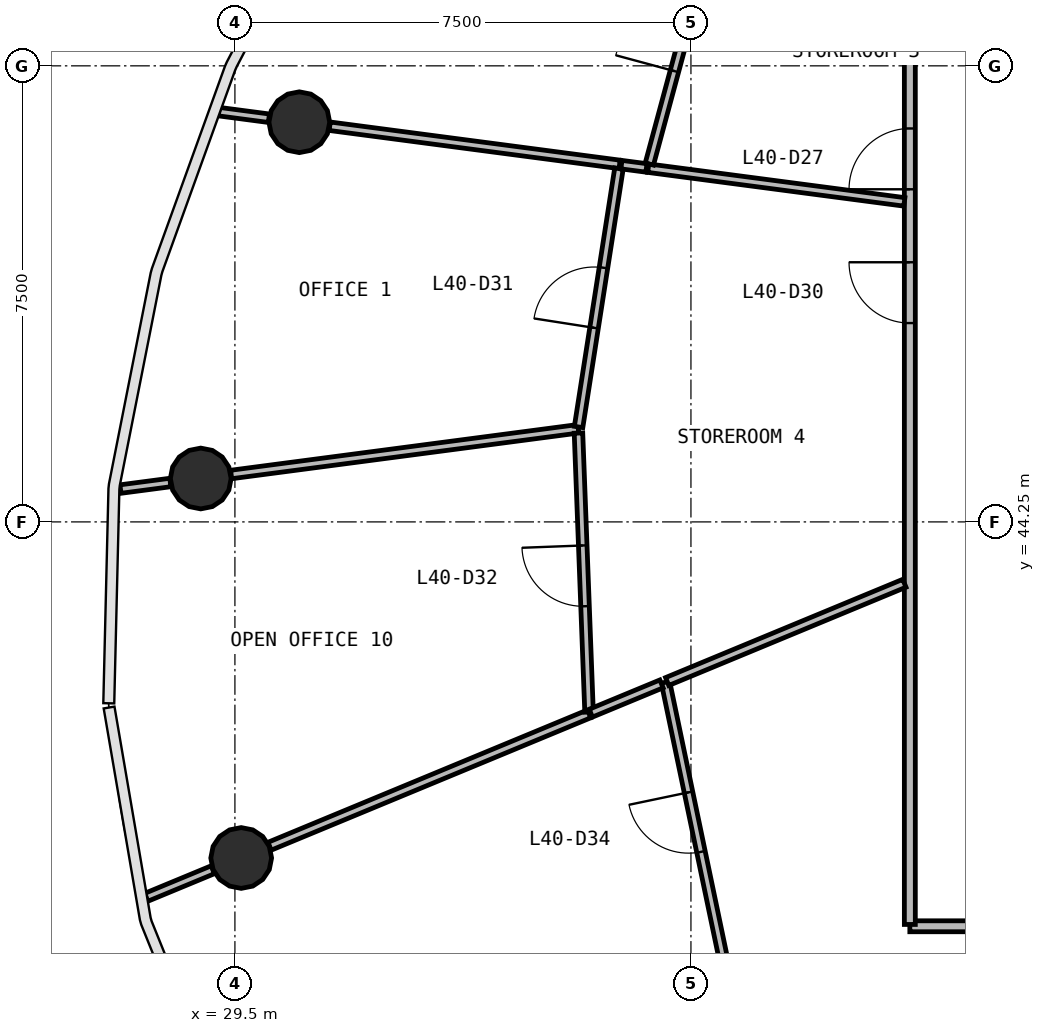
"""IFC4 building model, lengths in metres.
Left out: names, types, materials, properties, quantities, classifications, styles, units other than length and angle.
Written with IfcOpenShell. Run it as: python <this file> out.ifc"""

import sys

from ifc_helpers import new_model, si_unit, direction, frame, frame_2d, origin, origin_2d, place, context, subcontext, project, spatial, rectangle, circle, extrude, source, transform, mapped, element, fill, save


model = new_model("IFC4")
c1 = context("Model", 3, precision=1e-05, world=origin(), true_north=direction((0.0, 1.0)))
c2 = subcontext(c1, "Body", "Model", "MODEL_VIEW")
j1 = project(units=[si_unit("LENGTHUNIT", "METRE"), si_unit("PLANEANGLEUNIT", "RADIAN")], contexts=[c1])
p1 = place(None, origin())
s1 = spatial("IfcSite", under=j1, at=p1, CompositionType="ELEMENT")
p2 = place(p1, origin())
s2 = spatial("IfcBuilding", under=s1, at=p2, CompositionType="ELEMENT")
p3 = place(p2, frame((0.0, 0.0, 168.2)))
s3 = spatial("IfcBuildingStorey", under=s2, at=p3, CompositionType="ELEMENT", Elevation=168.2)
m1 = source(origin(), c2, "Body", "SweptSolid", [
    extrude(circle(Radius=0.5, at=origin_2d()), origin(), (0.0, 0.0, 1.0), 3.9),
])
for number, where, z_axis, x_axis in (
    (1, (30.559, 50.823, 0.0), (0.0, 0.0, 1.0), (1.0, 0.0, 0.0)),
    (2, (28.938, 44.964, 0.0), (0.0, 0.0, 1.0), (1.0, 0.0, 0.0)),
    (3, (29.603, 38.723, 0.0), (0.0, 0.0, 1.0), (1.0, 0.0, 0.0)),
):
    element("IfcColumn", number, at=place(p3, frame(where, z_axis=z_axis, x_axis=x_axis)), inside=s3, PredefinedType="COLUMN", context=c2, shape_type="MappedRepresentation", body=[
        mapped(m1, transform((0.0, 0.0, 0.0), scale=1.0)),
    ])
p4 = place(p3, frame((63.4, 37.6, 0.0), z_axis=(0.0, 0.0, 1.0), x_axis=(-1.0, 0.0, 0.0)))
e4 = element("IfcWall", 4, at=p4, inside=s3, PredefinedType="PARTITIONING", context=c2, shape_type="SweptSolid", body=[
    extrude(rectangle(XDim=22.8, YDim=0.18, at=frame_2d((11.4, 0.0))), origin(), (0.0, 0.0, 1.0), 2.88),
])
p5 = place(p4, frame((12.95, 0.0, 0.0)))
e5 = element("IfcOpeningElement", 5, at=p5, cuts=e4, PredefinedType="OPENING", context=c2, shape_type="SweptSolid", body=[
    extrude(rectangle(XDim=1.0, YDim=2.1, at=frame_2d((0.5, 1.05))), frame((0.0, 0.1, 0.0), z_axis=(0.0, -1.0, 0.0), x_axis=(1.0, 0.0, 0.0)), (0.0, 0.0, 1.0), 0.2),
])
p6 = place(p4, frame((10.95, 0.0, 0.0)))
e6 = element("IfcOpeningElement", 6, at=p6, cuts=e4, PredefinedType="OPENING", context=c2, shape_type="SweptSolid", body=[
    extrude(rectangle(XDim=1.0, YDim=2.1, at=frame_2d((0.5, 1.05))), frame((0.0, 0.1, 0.0), z_axis=(0.0, -1.0, 0.0), x_axis=(1.0, 0.0, 0.0)), (0.0, 0.0, 1.0), 0.2),
])
p7 = place(p4, frame((5.75, 0.0, 0.0)))
e7 = element("IfcOpeningElement", 7, at=p7, cuts=e4, PredefinedType="OPENING", context=c2, shape_type="SweptSolid", body=[
    extrude(rectangle(XDim=1.0, YDim=2.1, at=frame_2d((0.5, 1.05))), frame((0.0, 0.1, 0.0), z_axis=(0.0, -1.0, 0.0), x_axis=(1.0, 0.0, 0.0)), (0.0, 0.0, 1.0), 0.2),
])
p8 = place(p3, frame((40.6, 37.63, 0.0), z_axis=(0.0, 0.0, 1.0), x_axis=(0.0, 1.0, 0.0)))
e8 = element("IfcWall", 8, at=p8, inside=s3, PredefinedType="PARTITIONING", context=c2, shape_type="SweptSolid", body=[
    extrude(rectangle(XDim=20.74, YDim=0.18, at=frame_2d((10.37, 0.0))), origin(), (0.0, 0.0, 1.0), 2.88),
])
p9 = place(p8, frame((12.09, 0.0, 0.0)))
e9 = element("IfcOpeningElement", 9, at=p9, cuts=e8, PredefinedType="OPENING", context=c2, shape_type="SweptSolid", body=[
    extrude(rectangle(XDim=1.0, YDim=2.1, at=frame_2d((0.5, 1.05))), frame((0.0, 0.1, 0.0), z_axis=(0.0, -1.0, 0.0), x_axis=(1.0, 0.0, 0.0)), (0.0, 0.0, 1.0), 0.2),
])
p10 = place(p8, frame((9.89, 0.0, 0.0)))
e10 = element("IfcOpeningElement", 10, at=p10, cuts=e8, PredefinedType="OPENING", context=c2, shape_type="SweptSolid", body=[
    extrude(rectangle(XDim=1.0, YDim=2.1, at=frame_2d((0.5, 1.05))), frame((0.0, 0.1, 0.0), z_axis=(0.0, -1.0, 0.0), x_axis=(1.0, 0.0, 0.0)), (0.0, 0.0, 1.0), 0.2),
])
p11 = place(p3, frame((35.148, 45.781, 0.0), z_axis=(0.0, 0.0, 1.0), x_axis=(-0.991450110542, -0.13048631463, 0.0)))
e11 = element("IfcWall", 11, at=p11, inside=s3, PredefinedType="PARTITIONING", context=c2, shape_type="SweptSolid", body=[
    extrude(rectangle(XDim=5.759, YDim=0.14, at=frame_2d((2.879, 0.0))), origin(), (0.0, 0.0, 1.0), 2.88),
])
p12 = place(p3, frame((35.325, 41.093, 0.0), z_axis=(0.0, 0.0, 1.0), x_axis=(-0.923876123861, -0.38269166147, 0.0)))
e12 = element("IfcWall", 12, at=p12, inside=s3, PredefinedType="PARTITIONING", context=c2, shape_type="SweptSolid", body=[
    extrude(rectangle(XDim=5.689, YDim=0.14, at=frame_2d((2.844, 0.0))), origin(), (0.0, 0.0, 1.0), 2.88),
])
p13 = place(p3, frame((35.827, 50.129, 0.0), z_axis=(0.0, 0.0, 1.0), x_axis=(-0.991450839052, 0.130480779208, 0.0)))
e13 = element("IfcWall", 13, at=p13, inside=s3, PredefinedType="PARTITIONING", context=c2, shape_type="SweptSolid", body=[
    extrude(rectangle(XDim=4.809, YDim=0.14, at=frame_2d((2.404, 0.0))), origin(), (0.0, 0.0, 1.0), 2.88),
])
p14 = place(p3, frame((37.557, 36.951, 0.0), z_axis=(0.0, 0.0, 1.0), x_axis=(-0.204772935083, 0.978809503968, 0.0)))
e14 = element("IfcWall", 14, at=p14, inside=s3, PredefinedType="PARTITIONING", context=c2, shape_type="SweptSolid", body=[
    extrude(rectangle(XDim=4.763, YDim=0.14, at=frame_2d((2.381, 0.0))), origin(), (0.0, 0.0, 1.0), 2.88),
])
p15 = place(p14, frame((1.913, 0.0, 0.0)))
e15 = element("IfcOpeningElement", 15, at=p15, cuts=e14, PredefinedType="OPENING", context=c2, shape_type="SweptSolid", body=[
    extrude(rectangle(XDim=1.0, YDim=2.1, at=frame_2d((0.5, 1.05))), frame((0.0, 0.08, 0.0), z_axis=(0.0, -1.0, 0.0), x_axis=(1.0, 0.0, 0.0)), (0.0, 0.0, 1.0), 0.16),
])
p16 = place(p3, frame((35.324, 41.123, 0.0), z_axis=(0.0, 0.0, 1.0), x_axis=(-0.03785928554, 0.999283080262, 0.0)))
e16 = element("IfcWall", 16, at=p16, inside=s3, PredefinedType="PARTITIONING", context=c2, shape_type="SweptSolid", body=[
    extrude(rectangle(XDim=4.591, YDim=0.14, at=frame_2d((2.296, 0.0))), origin(), (0.0, 0.0, 1.0), 2.88),
])
p17 = place(p16, frame((1.741, 0.0, 0.0)))
e17 = element("IfcOpeningElement", 17, at=p17, cuts=e16, PredefinedType="OPENING", context=c2, shape_type="SweptSolid", body=[
    extrude(rectangle(XDim=1.0, YDim=2.1, at=frame_2d((0.5, 1.05))), frame((0.0, 0.08, 0.0), z_axis=(0.0, -1.0, 0.0), x_axis=(1.0, 0.0, 0.0)), (0.0, 0.0, 1.0), 0.16),
])
p18 = place(p3, frame((35.152, 45.811, 0.0), z_axis=(0.0, 0.0, 1.0), x_axis=(0.154356099054, 0.988015280593, 0.0)))
e18 = element("IfcWall", 18, at=p18, inside=s3, PredefinedType="PARTITIONING", context=c2, shape_type="SweptSolid", body=[
    extrude(rectangle(XDim=4.301, YDim=0.14, at=frame_2d((2.15, 0.0))), origin(), (0.0, 0.0, 1.0), 2.88),
])
p19 = place(p18, frame((1.651, 0.0, 0.0)))
e19 = element("IfcOpeningElement", 19, at=p19, cuts=e18, PredefinedType="OPENING", context=c2, shape_type="SweptSolid", body=[
    extrude(rectangle(XDim=1.0, YDim=2.1, at=frame_2d((0.5, 1.05))), frame((0.0, 0.08, 0.0), z_axis=(0.0, -1.0, 0.0), x_axis=(1.0, 0.0, 0.0)), (0.0, 0.0, 1.0), 0.16),
])
p20 = place(p3, frame((40.51, 43.241, 0.0), z_axis=(0.0, 0.0, 1.0), x_axis=(-0.923873778324, -0.382697323908, 0.0)))
e20 = element("IfcWall", 20, at=p20, inside=s3, PredefinedType="PARTITIONING", context=c2, shape_type="SweptSolid", body=[
    extrude(rectangle(XDim=4.223, YDim=0.14, at=frame_2d((2.111, 0.0))), origin(), (0.0, 0.0, 1.0), 2.88),
])
p21 = place(p3, frame((40.51, 49.513, 0.0), z_axis=(0.0, 0.0, 1.0), x_axis=(-0.991441382379, 0.13055261509, 0.0)))
e21 = element("IfcWall", 21, at=p21, inside=s3, PredefinedType="PARTITIONING", context=c2, shape_type="SweptSolid", body=[
    extrude(rectangle(XDim=4.249, YDim=0.14, at=frame_2d((2.125, 0.0))), origin(), (0.0, 0.0, 1.0), 2.88),
])
p22 = place(p3, frame((36.316, 50.135, 0.0), z_axis=(0.0, 0.0, 1.0), x_axis=(0.260683344338, 0.965424359536, 0.0)))
e22 = element("IfcWall", 22, at=p22, inside=s3, PredefinedType="PARTITIONING", context=c2, shape_type="SweptSolid", body=[
    extrude(rectangle(XDim=4.033, YDim=0.14, at=frame_2d((2.016, 0.0))), origin(), (0.0, 0.0, 1.0), 2.88),
])
p23 = place(p22, frame((1.583, 0.0, 0.0)))
e23 = element("IfcOpeningElement", 23, at=p23, cuts=e22, PredefinedType="OPENING", context=c2, shape_type="SweptSolid", body=[
    extrude(rectangle(XDim=1.0, YDim=2.1, at=frame_2d((0.5, 1.05))), frame((0.0, 0.08, 0.0), z_axis=(0.0, -1.0, 0.0), x_axis=(1.0, 0.0, 0.0)), (0.0, 0.0, 1.0), 0.16),
])
p24 = place(p3, frame((36.515, 41.586, 0.0), z_axis=(0.0, 0.0, 1.0), x_axis=(-0.923855963606, -0.38274032778, 0.0)))
e24 = element("IfcWall", 24, at=p24, inside=s3, PredefinedType="PARTITIONING", context=c2, shape_type="SweptSolid", body=[
    extrude(rectangle(XDim=1.258, YDim=0.14, at=frame_2d((0.629, 0.0))), origin(), (0.0, 0.0, 1.0), 2.88),
])
p25 = place(p3, frame((29.137, 38.53, 0.0), z_axis=(0.0, 0.0, 1.0), x_axis=(-0.923891330959, -0.382654947151, 0.0)))
e25 = element("IfcWall", 25, at=p25, inside=s3, PredefinedType="PARTITIONING", context=c2, shape_type="SweptSolid", body=[
    extrude(rectangle(XDim=1.186, YDim=0.14, at=frame_2d((0.593, 0.0))), origin(), (0.0, 0.0, 1.0), 2.88),
])
p26 = place(p3, frame((30.059, 50.889, 0.0), z_axis=(0.0, 0.0, 1.0), x_axis=(-0.991457294924, 0.130431715243, 0.0)))
e26 = element("IfcWall", 26, at=p26, inside=s3, PredefinedType="PARTITIONING", context=c2, shape_type="SweptSolid", body=[
    extrude(rectangle(XDim=0.831, YDim=0.14, at=frame_2d((0.416, 0.0))), origin(), (0.0, 0.0, 1.0), 2.88),
])
p27 = place(p3, frame((28.438, 44.898, 0.0), z_axis=(0.0, 0.0, 1.0), x_axis=(-0.991448264879, -0.130500337426, 0.0)))
e27 = element("IfcWall", 27, at=p27, inside=s3, PredefinedType="PARTITIONING", context=c2, shape_type="SweptSolid", body=[
    extrude(rectangle(XDim=0.827, YDim=0.14, at=frame_2d((0.414, 0.0))), origin(), (0.0, 0.0, 1.0), 2.88),
])
p28 = place(p3, frame((36.268, 50.071, 0.0), z_axis=(0.0, 0.0, 1.0), x_axis=(-0.991508286842, 0.130043520114, 0.0)))
e28 = element("IfcWall", 28, at=p28, inside=s3, PredefinedType="PARTITIONING", context=c2, shape_type="SweptSolid", body=[
    extrude(rectangle(XDim=0.415, YDim=0.14, at=frame_2d((0.208, 0.0))), origin(), (0.0, 0.0, 1.0), 2.88),
])
m2 = source(origin(), c2, "Body", "SweptSolid", [
    extrude(rectangle(XDim=1.0, YDim=2.1, at=frame_2d((0.5, 1.05))), frame((0.0, 0.025, 0.0), z_axis=(0.0, -1.0, 0.0), x_axis=(1.0, 0.0, 0.0)), (0.0, 0.0, 1.0), 0.05),
])
p29 = place(p9, origin())
e29 = element("IfcDoor", 29, at=p29, inside=s3, OperationType="SINGLE_SWING_LEFT", PredefinedType="DOOR", context=c2, shape_type="MappedRepresentation", body=[
    mapped(m2, transform((0.0, 0.0, 0.0), scale=1.0)),
])
fill(e9, e29)
p30 = place(p23, origin())
e30 = element("IfcDoor", 30, at=p30, inside=s3, OperationType="SINGLE_SWING_LEFT", PredefinedType="DOOR", context=c2, shape_type="MappedRepresentation", body=[
    mapped(m2, transform((0.0, 0.0, 0.0), scale=1.0)),
])
fill(e23, e30)
p31 = place(p10, origin())
e31 = element("IfcDoor", 31, at=p31, inside=s3, OperationType="SINGLE_SWING_RIGHT", PredefinedType="DOOR", context=c2, shape_type="MappedRepresentation", body=[
    mapped(m2, transform((0.0, 0.0, 0.0), scale=1.0)),
])
fill(e10, e31)
p32 = place(p19, origin())
e32 = element("IfcDoor", 32, at=p32, inside=s3, OperationType="SINGLE_SWING_LEFT", PredefinedType="DOOR", context=c2, shape_type="MappedRepresentation", body=[
    mapped(m2, transform((0.0, 0.0, 0.0), scale=1.0)),
])
fill(e19, e32)
p33 = place(p17, origin())
e33 = element("IfcDoor", 33, at=p33, inside=s3, OperationType="SINGLE_SWING_RIGHT", PredefinedType="DOOR", context=c2, shape_type="MappedRepresentation", body=[
    mapped(m2, transform((0.0, 0.0, 0.0), scale=1.0)),
])
fill(e17, e33)
p34 = place(p15, origin())
e34 = element("IfcDoor", 34, at=p34, inside=s3, OperationType="SINGLE_SWING_RIGHT", PredefinedType="DOOR", context=c2, shape_type="MappedRepresentation", body=[
    mapped(m2, transform((0.0, 0.0, 0.0), scale=1.0)),
])
fill(e15, e34)
save(model, sys.argv[1])
